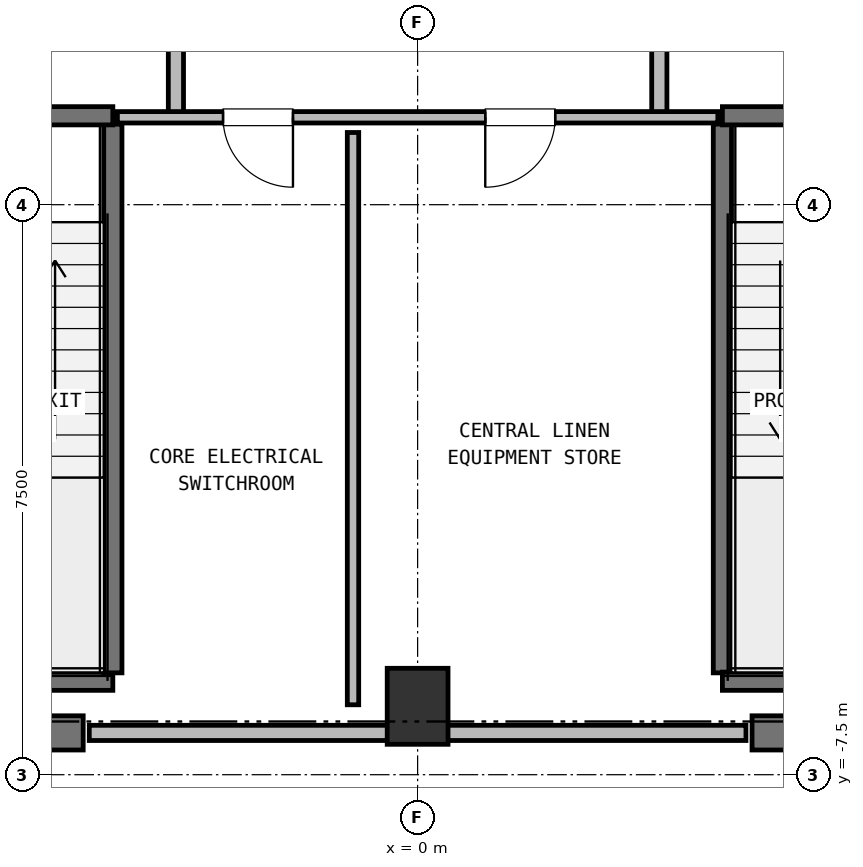
"""IFC4 building model, lengths in metres.
Left out: names, types, materials, properties, quantities, classifications, styles, units other than length and angle.
Written with IfcOpenShell. Run it as: python <this file> out.ifc"""

import sys

from ifc_helpers import new_model, si_unit, direction, frame, frame_2d, origin, origin_2d, place, context, subcontext, project, spatial, rectangle, extrude, element, fill, save


model = new_model("IFC4")
c1 = context("Model", 3, precision=1e-05, world=origin(), true_north=direction((0.0, 1.0)))
c2 = subcontext(c1, "Body", "Model", "MODEL_VIEW")
j1 = project(units=[si_unit("LENGTHUNIT", "METRE"), si_unit("PLANEANGLEUNIT", "RADIAN")], contexts=[c1])
p1 = place(None, origin())
s1 = spatial("IfcSite", under=j1, at=p1, CompositionType="ELEMENT")
p2 = place(p1, origin())
s2 = spatial("IfcBuilding", under=s1, at=p2, CompositionType="ELEMENT")
p3 = place(p2, frame((0.0, 0.0, 277.2)))
s3 = spatial("IfcBuildingStorey", under=s2, at=p3, CompositionType="ELEMENT", Elevation=277.2)
p4 = place(p3, frame((0.0, -6.6, 0.0), z_axis=(0.0, 0.0, 1.0), x_axis=(1.0, 0.0, 0.0)))
e1 = element("IfcColumn", 1, at=p4, inside=s3, PredefinedType="COLUMN", context=c2, shape_type="SweptSolid", body=[
    extrude(rectangle(XDim=0.8, YDim=1.0, at=origin_2d()), origin(), (0.0, 0.0, 1.0), 4.4),
])
for number, where, z_axis, x_axis in (
    (2, (-8.35, -6.95, 0.0), (0.0, 0.0, 1.0), (1.0, 0.0, 0.0)),
    (3, (4.4, -6.95, 0.0), (0.0, 0.0, 1.0), (1.0, 0.0, 0.0)),
):
    element("IfcWall", number, at=place(p3, frame(where, z_axis=z_axis, x_axis=x_axis)), inside=s3, PredefinedType="SHEAR", context=c2, shape_type="SweptSolid", body=[
        extrude(rectangle(XDim=3.95, YDim=0.45, at=frame_2d((1.975, 0.0))), origin(), (0.0, 0.0, 1.0), 4.15),
    ])
p5 = place(p3, frame((-7.6, -6.27, 0.0), z_axis=(0.0, 0.0, 1.0), x_axis=(1.0, 0.0, 0.0)))
e4 = element("IfcWall", 4, at=p5, inside=s3, PredefinedType="SHEAR", context=c2, shape_type="SweptSolid", body=[
    extrude(rectangle(XDim=3.59, YDim=0.24, at=frame_2d((1.795, 0.0))), origin(), (0.0, 0.0, 1.0), 4.15),
])
p6 = place(p3, frame((-4.01, -6.16, 0.0), z_axis=(0.0, 0.0, 1.0), x_axis=(0.0, 1.0, 0.0)))
e5 = element("IfcWall", 5, at=p6, inside=s3, PredefinedType="SHEAR", context=c2, shape_type="SweptSolid", body=[
    extrude(rectangle(XDim=7.22, YDim=0.24, at=frame_2d((3.61, 0.0))), origin(), (0.0, 0.0, 1.0), 4.15),
])
p7 = place(p3, frame((-6.97, 1.17, 0.0), z_axis=(0.0, 0.0, 1.0), x_axis=(1.0, 0.0, 0.0)))
e6 = element("IfcWall", 6, at=p7, inside=s3, PredefinedType="SHEAR", context=c2, shape_type="SweptSolid", body=[
    extrude(rectangle(XDim=2.96, YDim=0.24, at=frame_2d((1.48, 0.0))), origin(), (0.0, 0.0, 1.0), 4.15),
])
p8 = place(p7, frame((0.9, 0.0, 0.0)))
e7 = element("IfcOpeningElement", 7, at=p8, cuts=e6, PredefinedType="OPENING", context=c2, shape_type="SweptSolid", body=[
    extrude(rectangle(XDim=1.15, YDim=2.15, at=frame_2d((0.575, 1.075))), frame((0.0, 0.13, 0.0), z_axis=(0.0, -1.0, 0.0), x_axis=(1.0, 0.0, 0.0)), (0.0, 0.0, 1.0), 0.26),
])
p9 = place(p3, frame((4.01, -6.16, 0.0), z_axis=(0.0, 0.0, 1.0), x_axis=(0.0, 1.0, 0.0)))
e8 = element("IfcWall", 8, at=p9, inside=s3, PredefinedType="SHEAR", context=c2, shape_type="SweptSolid", body=[
    extrude(rectangle(XDim=7.22, YDim=0.24, at=frame_2d((3.61, 0.0))), origin(), (0.0, 0.0, 1.0), 4.15),
])
p10 = place(p3, frame((4.01, -6.27, 0.0), z_axis=(0.0, 0.0, 1.0), x_axis=(1.0, 0.0, 0.0)))
e9 = element("IfcWall", 9, at=p10, inside=s3, PredefinedType="SHEAR", context=c2, shape_type="SweptSolid", body=[
    extrude(rectangle(XDim=3.59, YDim=0.24, at=frame_2d((1.795, 0.0))), origin(), (0.0, 0.0, 1.0), 4.15),
])
p11 = place(p3, frame((4.01, 1.17, 0.0), z_axis=(0.0, 0.0, 1.0), x_axis=(1.0, 0.0, 0.0)))
e10 = element("IfcWall", 10, at=p11, inside=s3, PredefinedType="SHEAR", context=c2, shape_type="SweptSolid", body=[
    extrude(rectangle(XDim=2.96, YDim=0.24, at=frame_2d((1.48, 0.0))), origin(), (0.0, 0.0, 1.0), 4.15),
])
p12 = place(p11, frame((0.9, 0.0, 0.0)))
e11 = element("IfcOpeningElement", 11, at=p12, cuts=e10, PredefinedType="OPENING", context=c2, shape_type="SweptSolid", body=[
    extrude(rectangle(XDim=1.15, YDim=2.15, at=frame_2d((0.575, 1.075))), frame((0.0, 0.13, 0.0), z_axis=(0.0, -1.0, 0.0), x_axis=(1.0, 0.0, 0.0)), (0.0, 0.0, 1.0), 0.26),
])
p13 = place(p3, frame((-3.18, 1.15, 0.0), z_axis=(0.0, 0.0, 1.0), x_axis=(0.0, 1.0, 0.0)))
e12 = element("IfcWall", 12, at=p13, inside=s3, PredefinedType="PARTITIONING", context=c2, shape_type="SweptSolid", body=[
    extrude(rectangle(XDim=3.3, YDim=0.2, at=frame_2d((1.65, 0.0))), origin(), (0.0, 0.0, 1.0), 4.15),
])
p14 = place(p13, frame((1.08, 0.0, 0.0)))
e13 = element("IfcOpeningElement", 13, at=p14, cuts=e12, PredefinedType="OPENING", context=c2, shape_type="SweptSolid", body=[
    extrude(rectangle(XDim=1.15, YDim=2.15, at=frame_2d((0.575, 1.075))), frame((0.0, 0.11, 0.0), z_axis=(0.0, -1.0, 0.0), x_axis=(1.0, 0.0, 0.0)), (0.0, 0.0, 1.0), 0.22),
])
p15 = place(p3, frame((3.18, 1.15, 0.0), z_axis=(0.0, 0.0, 1.0), x_axis=(0.0, 1.0, 0.0)))
e14 = element("IfcWall", 14, at=p15, inside=s3, PredefinedType="PARTITIONING", context=c2, shape_type="SweptSolid", body=[
    extrude(rectangle(XDim=3.3, YDim=0.2, at=frame_2d((1.65, 0.0))), origin(), (0.0, 0.0, 1.0), 4.15),
])
p16 = place(p15, frame((1.08, 0.0, 0.0)))
e15 = element("IfcOpeningElement", 15, at=p16, cuts=e14, PredefinedType="OPENING", context=c2, shape_type="SweptSolid", body=[
    extrude(rectangle(XDim=1.15, YDim=2.15, at=frame_2d((0.575, 1.075))), frame((0.0, 0.11, 0.0), z_axis=(0.0, -1.0, 0.0), x_axis=(1.0, 0.0, 0.0)), (0.0, 0.0, 1.0), 0.22),
])
p17 = place(p3, frame((3.95, 1.15, 0.0), z_axis=(0.0, 0.0, 1.0), x_axis=(-1.0, 0.0, 0.0)))
e16 = element("IfcWall", 16, at=p17, inside=s3, PredefinedType="PARTITIONING", context=c2, shape_type="SweptSolid", body=[
    extrude(rectangle(XDim=7.9, YDim=0.15, at=frame_2d((3.95, 0.0))), origin(), (0.0, 0.0, 1.0), 4.15),
])
p18 = place(p17, frame((5.59, 0.0, 0.0)))
e17 = element("IfcOpeningElement", 17, at=p18, cuts=e16, PredefinedType="OPENING", context=c2, shape_type="SweptSolid", body=[
    extrude(rectangle(XDim=0.92, YDim=2.05, at=frame_2d((0.46, 1.025))), frame((0.0, 0.085, 0.0), z_axis=(0.0, -1.0, 0.0), x_axis=(1.0, 0.0, 0.0)), (0.0, 0.0, 1.0), 0.17),
])
p19 = place(p17, frame((2.14, 0.0, 0.0)))
e18 = element("IfcOpeningElement", 18, at=p19, cuts=e16, PredefinedType="OPENING", context=c2, shape_type="SweptSolid", body=[
    extrude(rectangle(XDim=0.92, YDim=2.05, at=frame_2d((0.46, 1.025))), frame((0.0, 0.085, 0.0), z_axis=(0.0, -1.0, 0.0), x_axis=(1.0, 0.0, 0.0)), (0.0, 0.0, 1.0), 0.17),
])
p20 = place(p3, frame((-4.32, -6.95, 0.0), z_axis=(0.0, 0.0, 1.0), x_axis=(1.0, 0.0, 0.0)))
e19 = element("IfcWall", 19, at=p20, inside=s3, PredefinedType="PARTITIONING", context=c2, shape_type="SweptSolid", body=[
    extrude(rectangle(XDim=8.64, YDim=0.2, at=frame_2d((4.32, 0.0))), origin(), (0.0, 0.0, 1.0), 4.15),
])
p21 = place(p3, frame((-0.85, -6.58, 0.0), z_axis=(0.0, 0.0, 1.0), x_axis=(0.0, 1.0, 0.0)))
e20 = element("IfcWall", 20, at=p21, inside=s3, PredefinedType="PARTITIONING", context=c2, shape_type="SweptSolid", body=[
    extrude(rectangle(XDim=7.53, YDim=0.15, at=frame_2d((3.765, 0.0))), origin(), (0.0, 0.0, 1.0), 4.15),
])
p22 = place(p18, origin())
e21 = element("IfcDoor", 21, at=p22, inside=s3, OperationType="SINGLE_SWING_LEFT", PredefinedType="DOOR", context=c2, shape_type="SweptSolid", body=[
    extrude(rectangle(XDim=0.92, YDim=2.05, at=frame_2d((0.46, 1.025))), frame((0.0, 0.025, 0.0), z_axis=(0.0, -1.0, 0.0), x_axis=(1.0, 0.0, 0.0)), (0.0, 0.0, 1.0), 0.05),
])
fill(e17, e21)
p23 = place(p19, origin())
e22 = element("IfcDoor", 22, at=p23, inside=s3, OperationType="SINGLE_SWING_RIGHT", PredefinedType="DOOR", context=c2, shape_type="SweptSolid", body=[
    extrude(rectangle(XDim=0.92, YDim=2.05, at=frame_2d((0.46, 1.025))), frame((0.0, 0.025, 0.0), z_axis=(0.0, -1.0, 0.0), x_axis=(1.0, 0.0, 0.0)), (0.0, 0.0, 1.0), 0.05),
])
fill(e18, e22)
save(model, sys.argv[1])
